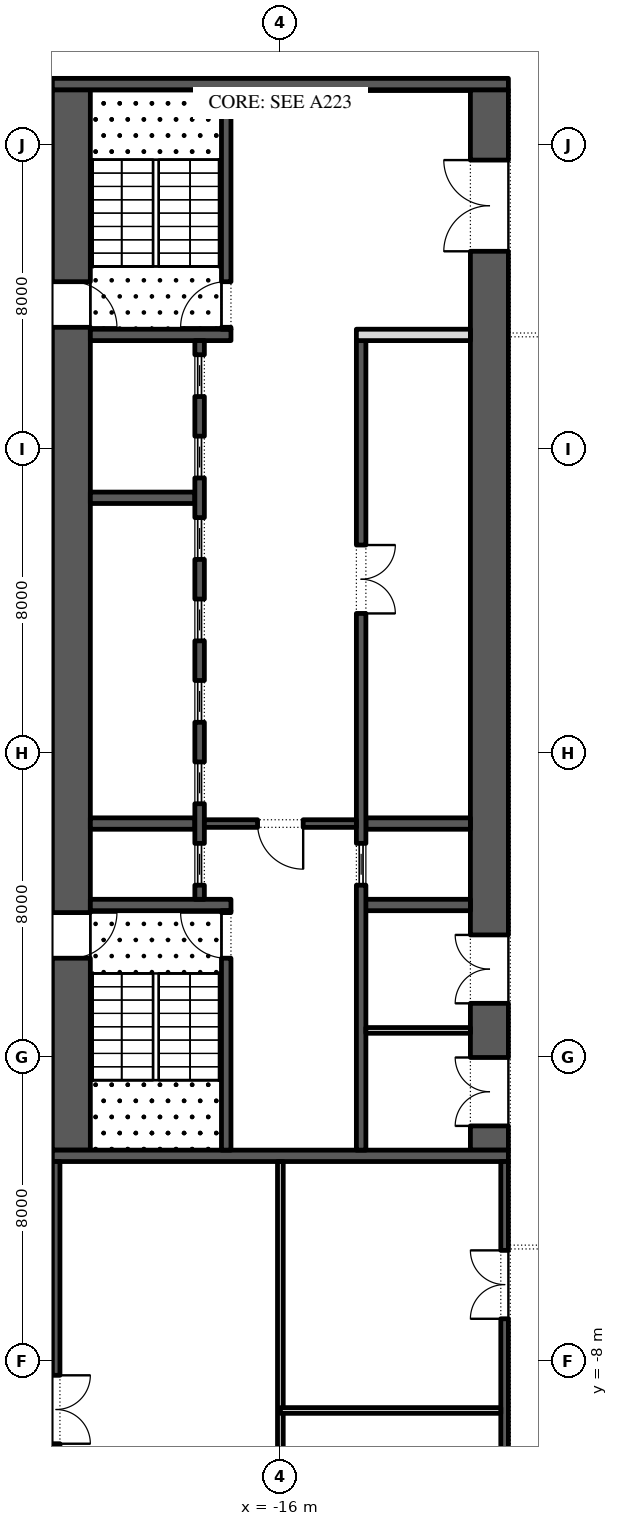
"""IFC4 building model, lengths in metres.
Left out: names, types, materials, properties, quantities, classifications, styles, units other than length and angle.
Written with IfcOpenShell. Run it as: python <this file> out.ifc"""

import sys

from ifc_helpers import new_model, si_unit, direction, frame, frame_2d, origin, place, context, subcontext, project, spatial, rectangle, extrude, element, fill, save


model = new_model("IFC4")
c1 = context("Model", 3, precision=1e-05, world=origin(), true_north=direction((0.0, 1.0)))
c2 = subcontext(c1, "Body", "Model", "MODEL_VIEW")
j1 = project(units=[si_unit("LENGTHUNIT", "METRE"), si_unit("PLANEANGLEUNIT", "RADIAN")], contexts=[c1])
p1 = place(None, origin())
s1 = spatial("IfcSite", under=j1, at=p1, CompositionType="ELEMENT")
p2 = place(p1, origin())
s2 = spatial("IfcBuilding", under=s1, at=p2, CompositionType="ELEMENT")
p3 = place(p2, frame((0.0, 0.0, 94.2)))
s3 = spatial("IfcBuildingStorey", under=s2, at=p3, CompositionType="ELEMENT", Elevation=94.2)
p4 = place(p3, frame((-21.5, -2.45, 0.0), z_axis=(0.0, 0.0, 1.0), x_axis=(0.0, 1.0, 0.0)))
e1 = element("IfcWall", 1, at=p4, inside=s3, PredefinedType="SHEAR", context=c2, shape_type="SweptSolid", body=[
    extrude(rectangle(XDim=27.9, YDim=1.0, at=frame_2d((13.95, 0.0))), origin(), (0.0, 0.0, 1.0), 4.95),
])
p5 = place(p4, frame((5.05, 0.0, 0.0)))
e2 = element("IfcOpeningElement", 2, at=p5, cuts=e1, PredefinedType="OPENING", context=c2, shape_type="SweptSolid", body=[
    extrude(rectangle(XDim=1.2, YDim=2.1, at=frame_2d((0.6, 1.05))), frame((0.0, 0.51, 0.0), z_axis=(0.0, -1.0, 0.0), x_axis=(1.0, 0.0, 0.0)), (0.0, 0.0, 1.0), 1.02),
])
p6 = place(p4, frame((21.65, 0.0, 0.0)))
e3 = element("IfcOpeningElement", 3, at=p6, cuts=e1, PredefinedType="OPENING", context=c2, shape_type="SweptSolid", body=[
    extrude(rectangle(XDim=1.2, YDim=2.1, at=frame_2d((0.6, 1.05))), frame((0.0, 0.51, 0.0), z_axis=(0.0, -1.0, 0.0), x_axis=(1.0, 0.0, 0.0)), (0.0, 0.0, 1.0), 1.02),
])
p7 = place(p3, frame((-10.5, -2.45, 0.0), z_axis=(0.0, 0.0, 1.0), x_axis=(0.0, 1.0, 0.0)))
e4 = element("IfcWall", 4, at=p7, inside=s3, PredefinedType="SHEAR", context=c2, shape_type="SweptSolid", body=[
    extrude(rectangle(XDim=27.9, YDim=1.0, at=frame_2d((13.95, 0.0))), origin(), (0.0, 0.0, 1.0), 4.95),
])
p8 = place(p7, frame((23.65, 0.0, 0.0)))
e5 = element("IfcOpeningElement", 5, at=p8, cuts=e4, PredefinedType="OPENING", context=c2, shape_type="SweptSolid", body=[
    extrude(rectangle(XDim=2.4, YDim=2.1, at=frame_2d((1.2, 1.05))), frame((0.0, 0.51, 0.0), z_axis=(0.0, -1.0, 0.0), x_axis=(1.0, 0.0, 0.0)), (0.0, 0.0, 1.0), 1.02),
])
p9 = place(p7, frame((0.637, 0.0, 0.0)))
e6 = element("IfcOpeningElement", 6, at=p9, cuts=e4, PredefinedType="OPENING", context=c2, shape_type="SweptSolid", body=[
    extrude(rectangle(XDim=1.8, YDim=2.4, at=frame_2d((0.9, 1.2))), frame((0.0, 0.51, 0.0), z_axis=(0.0, -1.0, 0.0), x_axis=(1.0, 0.0, 0.0)), (0.0, 0.0, 1.0), 1.02),
])
p10 = place(p7, frame((3.863, 0.0, 0.0)))
e7 = element("IfcOpeningElement", 7, at=p10, cuts=e4, PredefinedType="OPENING", context=c2, shape_type="SweptSolid", body=[
    extrude(rectangle(XDim=1.8, YDim=2.4, at=frame_2d((0.9, 1.2))), frame((0.0, 0.51, 0.0), z_axis=(0.0, -1.0, 0.0), x_axis=(1.0, 0.0, 0.0)), (0.0, 0.0, 1.0), 1.02),
])
for number, where, z_axis, x_axis in (
    (8, (-22.0, -2.6, 0.0), (0.0, 0.0, 1.0), (1.0, 0.0, 0.0)),
    (9, (-22.0, 25.6, 0.0), (0.0, 0.0, 1.0), (1.0, 0.0, 0.0)),
):
    element("IfcWall", number, at=place(p3, frame(where, z_axis=z_axis, x_axis=x_axis)), inside=s3, PredefinedType="SHEAR", context=c2, shape_type="SweptSolid", body=[
        extrude(rectangle(XDim=12.0, YDim=0.3, at=frame_2d((6.0, 0.0))), origin(), (0.0, 0.0, 1.0), 4.95),
    ])
p11 = place(p3, frame((-21.0, 4.0, 0.0), z_axis=(0.0, 0.0, 1.0), x_axis=(1.0, 0.0, 0.0)))
e10 = element("IfcWall", 10, at=p11, inside=s3, PredefinedType="SHEAR", context=c2, shape_type="SweptSolid", body=[
    extrude(rectangle(XDim=3.7, YDim=0.3, at=frame_2d((1.85, 0.0))), origin(), (0.0, 0.0, 1.0), 4.95),
])
p12 = place(p3, frame((-17.425, -2.45, 0.0), z_axis=(0.0, 0.0, 1.0), x_axis=(0.0, 1.0, 0.0)))
e11 = element("IfcWall", 11, at=p12, inside=s3, PredefinedType="SHEAR", context=c2, shape_type="SweptSolid", body=[
    extrude(rectangle(XDim=6.3, YDim=0.25, at=frame_2d((3.15, 0.0))), origin(), (0.0, 0.0, 1.0), 4.95),
])
p13 = place(p12, frame((5.05, 0.0, 0.0)))
e12 = element("IfcOpeningElement", 12, at=p13, cuts=e11, PredefinedType="OPENING", context=c2, shape_type="SweptSolid", body=[
    extrude(rectangle(XDim=1.2, YDim=2.1, at=frame_2d((0.6, 1.05))), frame((0.0, 0.135, 0.0), z_axis=(0.0, -1.0, 0.0), x_axis=(1.0, 0.0, 0.0)), (0.0, 0.0, 1.0), 0.27),
])
p14 = place(p3, frame((-21.0, 19.0, 0.0), z_axis=(0.0, 0.0, 1.0), x_axis=(1.0, 0.0, 0.0)))
e13 = element("IfcWall", 13, at=p14, inside=s3, PredefinedType="SHEAR", context=c2, shape_type="SweptSolid", body=[
    extrude(rectangle(XDim=3.7, YDim=0.3, at=frame_2d((1.85, 0.0))), origin(), (0.0, 0.0, 1.0), 4.95),
])
p15 = place(p3, frame((-17.425, 19.15, 0.0), z_axis=(0.0, 0.0, 1.0), x_axis=(0.0, 1.0, 0.0)))
e14 = element("IfcWall", 14, at=p15, inside=s3, PredefinedType="SHEAR", context=c2, shape_type="SweptSolid", body=[
    extrude(rectangle(XDim=6.3, YDim=0.25, at=frame_2d((3.15, 0.0))), origin(), (0.0, 0.0, 1.0), 4.95),
])
p16 = place(p15, frame((0.05, 0.0, 0.0)))
e15 = element("IfcOpeningElement", 15, at=p16, cuts=e14, PredefinedType="OPENING", context=c2, shape_type="SweptSolid", body=[
    extrude(rectangle(XDim=1.2, YDim=2.1, at=frame_2d((0.6, 1.05))), frame((0.0, 0.135, 0.0), z_axis=(0.0, -1.0, 0.0), x_axis=(1.0, 0.0, 0.0)), (0.0, 0.0, 1.0), 0.27),
])
for number, where, z_axis, x_axis in (
    (16, (-21.0, 6.143, 0.0), (0.0, 0.0, 1.0), (1.0, 0.0, 0.0)),
    (17, (-21.0, 14.714, 0.0), (0.0, 0.0, 1.0), (1.0, 0.0, 0.0)),
):
    element("IfcWall", number, at=place(p3, frame(where, z_axis=z_axis, x_axis=x_axis)), inside=s3, PredefinedType="SHEAR", context=c2, shape_type="SweptSolid", body=[
        extrude(rectangle(XDim=2.75, YDim=0.3, at=frame_2d((1.375, 0.0))), origin(), (0.0, 0.0, 1.0), 4.95),
    ])
p17 = place(p3, frame((-18.125, 4.15, 0.0), z_axis=(0.0, 0.0, 1.0), x_axis=(0.0, 1.0, 0.0)))
e18 = element("IfcWall", 18, at=p17, inside=s3, PredefinedType="SHEAR", context=c2, shape_type="SweptSolid", body=[
    extrude(rectangle(XDim=14.7, YDim=0.25, at=frame_2d((7.35, 0.0))), origin(), (0.0, 0.0, 1.0), 4.95),
])
p18 = place(p17, frame((0.371, 0.0, 0.0)))
e19 = element("IfcOpeningElement", 19, at=p18, cuts=e18, PredefinedType="OPENING", context=c2, shape_type="SweptSolid", body=[
    extrude(rectangle(XDim=1.1, YDim=2.1, at=frame_2d((0.55, 1.05))), frame((0.0, 0.135, 0.0), z_axis=(0.0, -1.0, 0.0), x_axis=(1.0, 0.0, 0.0)), (0.0, 0.0, 1.0), 0.27),
])
p19 = place(p17, frame((2.514, 0.0, 0.0)))
e20 = element("IfcOpeningElement", 20, at=p19, cuts=e18, PredefinedType="OPENING", context=c2, shape_type="SweptSolid", body=[
    extrude(rectangle(XDim=1.1, YDim=2.1, at=frame_2d((0.55, 1.05))), frame((0.0, 0.135, 0.0), z_axis=(0.0, -1.0, 0.0), x_axis=(1.0, 0.0, 0.0)), (0.0, 0.0, 1.0), 0.27),
])
p20 = place(p17, frame((4.657, 0.0, 0.0)))
e21 = element("IfcOpeningElement", 21, at=p20, cuts=e18, PredefinedType="OPENING", context=c2, shape_type="SweptSolid", body=[
    extrude(rectangle(XDim=1.1, YDim=2.1, at=frame_2d((0.55, 1.05))), frame((0.0, 0.135, 0.0), z_axis=(0.0, -1.0, 0.0), x_axis=(1.0, 0.0, 0.0)), (0.0, 0.0, 1.0), 0.27),
])
p21 = place(p17, frame((6.8, 0.0, 0.0)))
e22 = element("IfcOpeningElement", 22, at=p21, cuts=e18, PredefinedType="OPENING", context=c2, shape_type="SweptSolid", body=[
    extrude(rectangle(XDim=1.1, YDim=2.1, at=frame_2d((0.55, 1.05))), frame((0.0, 0.135, 0.0), z_axis=(0.0, -1.0, 0.0), x_axis=(1.0, 0.0, 0.0)), (0.0, 0.0, 1.0), 0.27),
])
p22 = place(p17, frame((8.943, 0.0, 0.0)))
e23 = element("IfcOpeningElement", 23, at=p22, cuts=e18, PredefinedType="OPENING", context=c2, shape_type="SweptSolid", body=[
    extrude(rectangle(XDim=1.1, YDim=2.1, at=frame_2d((0.55, 1.05))), frame((0.0, 0.135, 0.0), z_axis=(0.0, -1.0, 0.0), x_axis=(1.0, 0.0, 0.0)), (0.0, 0.0, 1.0), 0.27),
])
p23 = place(p17, frame((11.086, 0.0, 0.0)))
e24 = element("IfcOpeningElement", 24, at=p23, cuts=e18, PredefinedType="OPENING", context=c2, shape_type="SweptSolid", body=[
    extrude(rectangle(XDim=1.1, YDim=2.1, at=frame_2d((0.55, 1.05))), frame((0.0, 0.135, 0.0), z_axis=(0.0, -1.0, 0.0), x_axis=(1.0, 0.0, 0.0)), (0.0, 0.0, 1.0), 0.27),
])
p24 = place(p17, frame((13.229, 0.0, 0.0)))
e25 = element("IfcOpeningElement", 25, at=p24, cuts=e18, PredefinedType="OPENING", context=c2, shape_type="SweptSolid", body=[
    extrude(rectangle(XDim=1.1, YDim=2.1, at=frame_2d((0.55, 1.05))), frame((0.0, 0.135, 0.0), z_axis=(0.0, -1.0, 0.0), x_axis=(1.0, 0.0, 0.0)), (0.0, 0.0, 1.0), 0.27),
])
p25 = place(p3, frame((-14.0, 4.0, 0.0), z_axis=(0.0, 0.0, 1.0), x_axis=(1.0, 0.0, 0.0)))
e26 = element("IfcWall", 26, at=p25, inside=s3, PredefinedType="SHEAR", context=c2, shape_type="SweptSolid", body=[
    extrude(rectangle(XDim=3.0, YDim=0.3, at=frame_2d((1.5, 0.0))), origin(), (0.0, 0.0, 1.0), 4.95),
])
p26 = place(p3, frame((-13.75, 6.143, 0.0), z_axis=(0.0, 0.0, 1.0), x_axis=(1.0, 0.0, 0.0)))
e27 = element("IfcWall", 27, at=p26, inside=s3, PredefinedType="SHEAR", context=c2, shape_type="SweptSolid", body=[
    extrude(rectangle(XDim=2.75, YDim=0.3, at=frame_2d((1.375, 0.0))), origin(), (0.0, 0.0, 1.0), 4.95),
])
p27 = place(p3, frame((-13.875, -2.45, 0.0), z_axis=(0.0, 0.0, 1.0), x_axis=(0.0, 1.0, 0.0)))
e28 = element("IfcWall", 28, at=p27, inside=s3, PredefinedType="SHEAR", context=c2, shape_type="SweptSolid", body=[
    extrude(rectangle(XDim=21.3, YDim=0.25, at=frame_2d((10.65, 0.0))), origin(), (0.0, 0.0, 1.0), 4.95),
])
p28 = place(p27, frame((14.121, 0.0, 0.0)))
e29 = element("IfcOpeningElement", 29, at=p28, cuts=e28, PredefinedType="OPENING", context=c2, shape_type="SweptSolid", body=[
    extrude(rectangle(XDim=1.8, YDim=2.4, at=frame_2d((0.9, 1.2))), frame((0.0, 0.135, 0.0), z_axis=(0.0, -1.0, 0.0), x_axis=(1.0, 0.0, 0.0)), (0.0, 0.0, 1.0), 0.27),
])
p29 = place(p27, frame((6.971, 0.0, 0.0)))
e30 = element("IfcOpeningElement", 30, at=p29, cuts=e28, PredefinedType="OPENING", context=c2, shape_type="SweptSolid", body=[
    extrude(rectangle(XDim=1.1, YDim=2.1, at=frame_2d((0.55, 1.05))), frame((0.0, 0.135, 0.0), z_axis=(0.0, -1.0, 0.0), x_axis=(1.0, 0.0, 0.0)), (0.0, 0.0, 1.0), 0.27),
])
p30 = place(p3, frame((-14.0, 19.0, 0.0), z_axis=(0.0, 0.0, 1.0), x_axis=(1.0, 0.0, 0.0)))
e31 = element("IfcWall", 31, at=p30, inside=s3, PredefinedType="PARTITIONING", context=c2, shape_type="SweptSolid", body=[
    extrude(rectangle(XDim=3.0, YDim=0.3, at=frame_2d((1.5, 0.0))), origin(), (0.0, 0.0, 1.0), 4.95),
])
p31 = place(p3, frame((-18.0, 6.143, 0.0), z_axis=(0.0, 0.0, 1.0), x_axis=(1.0, 0.0, 0.0)))
e32 = element("IfcWall", 32, at=p31, inside=s3, PredefinedType="SHEAR", context=c2, shape_type="SweptSolid", body=[
    extrude(rectangle(XDim=4.0, YDim=0.2, at=frame_2d((2.0, 0.0))), origin(), (0.0, 0.0, 1.0), 4.95),
])
p32 = place(p31, frame((1.4, 0.0, 0.0)))
e33 = element("IfcOpeningElement", 33, at=p32, cuts=e32, PredefinedType="OPENING", context=c2, shape_type="SweptSolid", body=[
    extrude(rectangle(XDim=1.2, YDim=2.1, at=frame_2d((0.6, 1.05))), frame((0.0, 0.11, 0.0), z_axis=(0.0, -1.0, 0.0), x_axis=(1.0, 0.0, 0.0)), (0.0, 0.0, 1.0), 0.22),
])
p33 = place(p3, frame((-13.75, 0.7, 0.0), z_axis=(0.0, 0.0, 1.0), x_axis=(1.0, 0.0, 0.0)))
e34 = element("IfcWall", 34, at=p33, inside=s3, PredefinedType="PARTITIONING", context=c2, shape_type="SweptSolid", body=[
    extrude(rectangle(XDim=2.75, YDim=0.15, at=frame_2d((1.375, 0.0))), origin(), (0.0, 0.0, 1.0), 4.95),
])
p34 = place(p3, frame((-21.9, -15.8, 0.0), z_axis=(0.0, 0.0, 1.0), x_axis=(0.0, 1.0, 0.0)))
e35 = element("IfcWall", 35, at=p34, inside=s3, PredefinedType="SHEAR", context=c2, shape_type="SweptSolid", body=[
    extrude(rectangle(XDim=13.05, YDim=0.2, at=frame_2d((6.525, 0.0))), origin(), (0.0, 0.0, 1.0), 4.95),
])
p35 = place(p34, frame((5.625, 0.0, 0.0)))
e36 = element("IfcOpeningElement", 36, at=p35, cuts=e35, PredefinedType="OPENING", context=c2, shape_type="SweptSolid", body=[
    extrude(rectangle(XDim=1.8, YDim=2.4, at=frame_2d((0.9, 1.2))), frame((0.0, 0.11, 0.0), z_axis=(0.0, -1.0, 0.0), x_axis=(1.0, 0.0, 0.0)), (0.0, 0.0, 1.0), 0.22),
])
p36 = place(p3, frame((-10.1, -15.8, 0.0), z_axis=(0.0, 0.0, 1.0), x_axis=(0.0, 1.0, 0.0)))
e37 = element("IfcWall", 37, at=p36, inside=s3, PredefinedType="SHEAR", context=c2, shape_type="SweptSolid", body=[
    extrude(rectangle(XDim=13.05, YDim=0.2, at=frame_2d((6.525, 0.0))), origin(), (0.0, 0.0, 1.0), 4.95),
])
p37 = place(p36, frame((2.312, 0.0, 0.0)))
e38 = element("IfcOpeningElement", 38, at=p37, cuts=e37, PredefinedType="OPENING", context=c2, shape_type="SweptSolid", body=[
    extrude(rectangle(XDim=1.8, YDim=2.4, at=frame_2d((0.9, 1.2))), frame((0.0, 0.11, 0.0), z_axis=(0.0, -1.0, 0.0), x_axis=(1.0, 0.0, 0.0)), (0.0, 0.0, 1.0), 0.22),
])
p38 = place(p36, frame((8.913, 0.0, 0.0)))
e39 = element("IfcOpeningElement", 39, at=p38, cuts=e37, PredefinedType="OPENING", context=c2, shape_type="SweptSolid", body=[
    extrude(rectangle(XDim=1.8, YDim=2.4, at=frame_2d((0.9, 1.2))), frame((0.0, 0.11, 0.0), z_axis=(0.0, -1.0, 0.0), x_axis=(1.0, 0.0, 0.0)), (0.0, 0.0, 1.0), 0.22),
])
p39 = place(p3, frame((-16.0, -15.8, 0.0), z_axis=(0.0, 0.0, 1.0), x_axis=(0.0, 1.0, 0.0)))
e40 = element("IfcWall", 40, at=p39, inside=s3, PredefinedType="PARTITIONING", context=c2, shape_type="SweptSolid", body=[
    extrude(rectangle(XDim=13.05, YDim=0.15, at=frame_2d((6.525, 0.0))), origin(), (0.0, 0.0, 1.0), 4.95),
])
p40 = place(p3, frame((-16.0, -9.3, 0.0), z_axis=(0.0, 0.0, 1.0), x_axis=(1.0, 0.0, 0.0)))
e41 = element("IfcWall", 41, at=p40, inside=s3, PredefinedType="PARTITIONING", context=c2, shape_type="SweptSolid", body=[
    extrude(rectangle(XDim=5.8, YDim=0.15, at=frame_2d((2.9, 0.0))), origin(), (0.0, 0.0, 1.0), 4.95),
])
p41 = place(p18, origin())
e42 = element("IfcDoor", 42, at=p41, inside=s3, OperationType="SLIDING_TO_LEFT", PredefinedType="DOOR", context=c2, shape_type="SweptSolid", body=[
    extrude(rectangle(XDim=1.1, YDim=2.1, at=frame_2d((0.55, 1.05))), frame((0.0, 0.025, 0.0), z_axis=(0.0, -1.0, 0.0), x_axis=(1.0, 0.0, 0.0)), (0.0, 0.0, 1.0), 0.05),
])
fill(e19, e42)
p42 = place(p19, origin())
e43 = element("IfcDoor", 43, at=p42, inside=s3, OperationType="SLIDING_TO_LEFT", PredefinedType="DOOR", context=c2, shape_type="SweptSolid", body=[
    extrude(rectangle(XDim=1.1, YDim=2.1, at=frame_2d((0.55, 1.05))), frame((0.0, 0.025, 0.0), z_axis=(0.0, -1.0, 0.0), x_axis=(1.0, 0.0, 0.0)), (0.0, 0.0, 1.0), 0.05),
])
fill(e20, e43)
p43 = place(p20, origin())
e44 = element("IfcDoor", 44, at=p43, inside=s3, OperationType="SLIDING_TO_LEFT", PredefinedType="DOOR", context=c2, shape_type="SweptSolid", body=[
    extrude(rectangle(XDim=1.1, YDim=2.1, at=frame_2d((0.55, 1.05))), frame((0.0, 0.025, 0.0), z_axis=(0.0, -1.0, 0.0), x_axis=(1.0, 0.0, 0.0)), (0.0, 0.0, 1.0), 0.05),
])
fill(e21, e44)
p44 = place(p21, origin())
e45 = element("IfcDoor", 45, at=p44, inside=s3, OperationType="SLIDING_TO_LEFT", PredefinedType="DOOR", context=c2, shape_type="SweptSolid", body=[
    extrude(rectangle(XDim=1.1, YDim=2.1, at=frame_2d((0.55, 1.05))), frame((0.0, 0.025, 0.0), z_axis=(0.0, -1.0, 0.0), x_axis=(1.0, 0.0, 0.0)), (0.0, 0.0, 1.0), 0.05),
])
fill(e22, e45)
p45 = place(p22, origin())
e46 = element("IfcDoor", 46, at=p45, inside=s3, OperationType="SLIDING_TO_LEFT", PredefinedType="DOOR", context=c2, shape_type="SweptSolid", body=[
    extrude(rectangle(XDim=1.1, YDim=2.1, at=frame_2d((0.55, 1.05))), frame((0.0, 0.025, 0.0), z_axis=(0.0, -1.0, 0.0), x_axis=(1.0, 0.0, 0.0)), (0.0, 0.0, 1.0), 0.05),
])
fill(e23, e46)
p46 = place(p23, origin())
e47 = element("IfcDoor", 47, at=p46, inside=s3, OperationType="SLIDING_TO_LEFT", PredefinedType="DOOR", context=c2, shape_type="SweptSolid", body=[
    extrude(rectangle(XDim=1.1, YDim=2.1, at=frame_2d((0.55, 1.05))), frame((0.0, 0.025, 0.0), z_axis=(0.0, -1.0, 0.0), x_axis=(1.0, 0.0, 0.0)), (0.0, 0.0, 1.0), 0.05),
])
fill(e24, e47)
p47 = place(p24, origin())
e48 = element("IfcDoor", 48, at=p47, inside=s3, OperationType="SLIDING_TO_LEFT", PredefinedType="DOOR", context=c2, shape_type="SweptSolid", body=[
    extrude(rectangle(XDim=1.1, YDim=2.1, at=frame_2d((0.55, 1.05))), frame((0.0, 0.025, 0.0), z_axis=(0.0, -1.0, 0.0), x_axis=(1.0, 0.0, 0.0)), (0.0, 0.0, 1.0), 0.05),
])
fill(e25, e48)
p48 = place(p28, frame((1.8, -0.2, 0.0), z_axis=(0.0, 0.0, 1.0), x_axis=(-1.0, 0.0, 0.0)))
e49 = element("IfcDoor", 49, at=p48, inside=s3, OperationType="DOUBLE_DOOR_SINGLE_SWING", PredefinedType="DOOR", context=c2, shape_type="SweptSolid", body=[
    extrude(rectangle(XDim=1.8, YDim=2.4, at=frame_2d((0.9, 1.2))), frame((0.0, -0.075, 0.0), z_axis=(0.0, -1.0, 0.0), x_axis=(1.0, 0.0, 0.0)), (0.0, 0.0, 1.0), 0.05),
])
fill(e29, e49)
p49 = place(p29, origin())
e50 = element("IfcDoor", 50, at=p49, inside=s3, OperationType="SLIDING_TO_LEFT", PredefinedType="DOOR", context=c2, shape_type="SweptSolid", body=[
    extrude(rectangle(XDim=1.1, YDim=2.1, at=frame_2d((0.55, 1.05))), frame((0.0, 0.025, 0.0), z_axis=(0.0, -1.0, 0.0), x_axis=(1.0, 0.0, 0.0)), (0.0, 0.0, 1.0), 0.05),
])
fill(e30, e50)
p50 = place(p32, frame((1.2, 0.0, 0.0), z_axis=(0.0, 0.0, 1.0), x_axis=(-1.0, 0.0, 0.0)))
e51 = element("IfcDoor", 51, at=p50, inside=s3, OperationType="SINGLE_SWING_RIGHT", PredefinedType="DOOR", context=c2, shape_type="SweptSolid", body=[
    extrude(rectangle(XDim=1.2, YDim=2.1, at=frame_2d((0.6, 1.05))), frame((0.0, 0.025, 0.0), z_axis=(0.0, -1.0, 0.0), x_axis=(1.0, 0.0, 0.0)), (0.0, 0.0, 1.0), 0.05),
])
fill(e33, e51)
p51 = place(p8, origin())
e52 = element("IfcDoor", 52, at=p51, inside=s3, OperationType="DOUBLE_DOOR_SINGLE_SWING", PredefinedType="DOOR", context=c2, shape_type="SweptSolid", body=[
    extrude(rectangle(XDim=2.4, YDim=2.1, at=frame_2d((1.2, 1.05))), frame((0.0, 0.025, 0.0), z_axis=(0.0, -1.0, 0.0), x_axis=(1.0, 0.0, 0.0)), (0.0, 0.0, 1.0), 0.05),
])
fill(e5, e52)
p52 = place(p13, origin())
e53 = element("IfcDoor", 53, at=p52, inside=s3, OperationType="SINGLE_SWING_LEFT", PredefinedType="DOOR", context=c2, shape_type="SweptSolid", body=[
    extrude(rectangle(XDim=1.2, YDim=2.1, at=frame_2d((0.6, 1.05))), frame((0.0, 0.025, 0.0), z_axis=(0.0, -1.0, 0.0), x_axis=(1.0, 0.0, 0.0)), (0.0, 0.0, 1.0), 0.05),
])
fill(e12, e53)
p53 = place(p5, frame((1.2, 0.0, 0.0), z_axis=(0.0, 0.0, 1.0), x_axis=(-1.0, 0.0, 0.0)))
e54 = element("IfcDoor", 54, at=p53, inside=s3, OperationType="SINGLE_SWING_RIGHT", PredefinedType="DOOR", context=c2, shape_type="SweptSolid", body=[
    extrude(rectangle(XDim=1.2, YDim=2.1, at=frame_2d((0.6, 1.05))), frame((0.0, 0.025, 0.0), z_axis=(0.0, -1.0, 0.0), x_axis=(1.0, 0.0, 0.0)), (0.0, 0.0, 1.0), 0.05),
])
fill(e2, e54)
p54 = place(p16, origin())
e55 = element("IfcDoor", 55, at=p54, inside=s3, OperationType="SINGLE_SWING_RIGHT", PredefinedType="DOOR", context=c2, shape_type="SweptSolid", body=[
    extrude(rectangle(XDim=1.2, YDim=2.1, at=frame_2d((0.6, 1.05))), frame((0.0, 0.025, 0.0), z_axis=(0.0, -1.0, 0.0), x_axis=(1.0, 0.0, 0.0)), (0.0, 0.0, 1.0), 0.05),
])
fill(e15, e55)
p55 = place(p6, frame((1.2, 0.0, 0.0), z_axis=(0.0, 0.0, 1.0), x_axis=(-1.0, 0.0, 0.0)))
e56 = element("IfcDoor", 56, at=p55, inside=s3, OperationType="SINGLE_SWING_LEFT", PredefinedType="DOOR", context=c2, shape_type="SweptSolid", body=[
    extrude(rectangle(XDim=1.2, YDim=2.1, at=frame_2d((0.6, 1.05))), frame((0.0, 0.025, 0.0), z_axis=(0.0, -1.0, 0.0), x_axis=(1.0, 0.0, 0.0)), (0.0, 0.0, 1.0), 0.05),
])
fill(e3, e56)
p56 = place(p9, origin())
e57 = element("IfcDoor", 57, at=p56, inside=s3, OperationType="DOUBLE_DOOR_SINGLE_SWING", PredefinedType="DOOR", context=c2, shape_type="SweptSolid", body=[
    extrude(rectangle(XDim=1.8, YDim=2.4, at=frame_2d((0.9, 1.2))), frame((0.0, 0.5, 0.0), z_axis=(0.0, -1.0, 0.0), x_axis=(1.0, 0.0, 0.0)), (0.0, 0.0, 1.0), 0.05),
])
fill(e6, e57)
p57 = place(p10, origin())
e58 = element("IfcDoor", 58, at=p57, inside=s3, OperationType="DOUBLE_DOOR_SINGLE_SWING", PredefinedType="DOOR", context=c2, shape_type="SweptSolid", body=[
    extrude(rectangle(XDim=1.8, YDim=2.4, at=frame_2d((0.9, 1.2))), frame((0.0, 0.5, 0.0), z_axis=(0.0, -1.0, 0.0), x_axis=(1.0, 0.0, 0.0)), (0.0, 0.0, 1.0), 0.05),
])
fill(e7, e58)
p58 = place(p35, frame((1.8, -0.15, 0.0), z_axis=(0.0, 0.0, 1.0), x_axis=(-1.0, 0.0, 0.0)))
e59 = element("IfcDoor", 59, at=p58, inside=s3, OperationType="DOUBLE_DOOR_SINGLE_SWING", PredefinedType="DOOR", context=c2, shape_type="SweptSolid", body=[
    extrude(rectangle(XDim=1.8, YDim=2.4, at=frame_2d((0.9, 1.2))), frame((0.0, -0.05, 0.0), z_axis=(0.0, -1.0, 0.0), x_axis=(1.0, 0.0, 0.0)), (0.0, 0.0, 1.0), 0.05),
])
fill(e36, e59)
p59 = place(p38, origin())
e60 = element("IfcDoor", 60, at=p59, inside=s3, OperationType="DOUBLE_DOOR_SINGLE_SWING", PredefinedType="DOOR", context=c2, shape_type="SweptSolid", body=[
    extrude(rectangle(XDim=1.8, YDim=2.4, at=frame_2d((0.9, 1.2))), frame((0.0, 0.1, 0.0), z_axis=(0.0, -1.0, 0.0), x_axis=(1.0, 0.0, 0.0)), (0.0, 0.0, 1.0), 0.05),
])
fill(e39, e60)
save(model, sys.argv[1])
